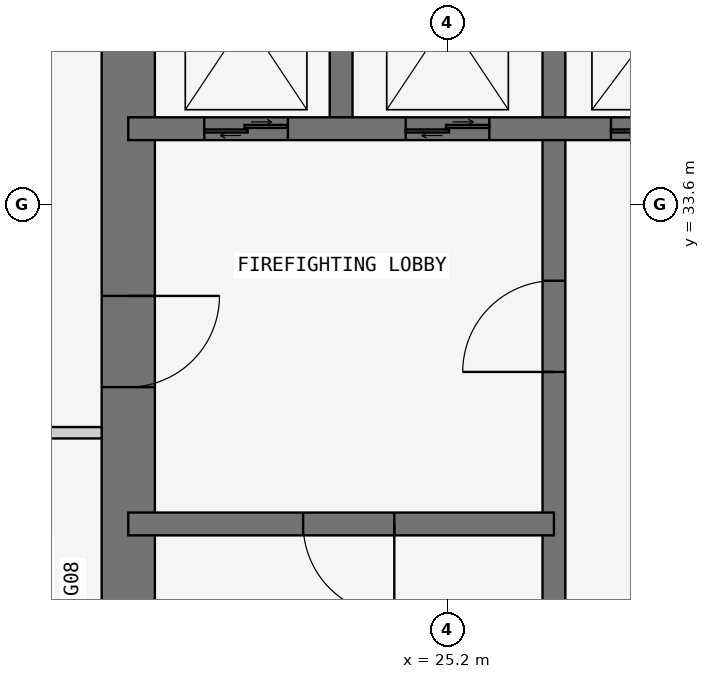
"""IFC4 building model, lengths in metres.
Left out: names, types, materials, properties, quantities, classifications, styles, units other than length and angle.
Written with IfcOpenShell. Run it as: python <this file> out.ifc"""

import sys

from ifc_helpers import new_model, si_unit, direction, frame, frame_2d, origin, place, context, subcontext, project, spatial, rectangle, extrude, element, fill, save


model = new_model("IFC4")
c1 = context("Model", 3, precision=1e-05, world=origin(), true_north=direction((0.0, 1.0)))
c2 = subcontext(c1, "Body", "Model", "MODEL_VIEW")
j1 = project(units=[si_unit("LENGTHUNIT", "METRE"), si_unit("PLANEANGLEUNIT", "RADIAN")], contexts=[c1])
p1 = place(None, origin())
s1 = spatial("IfcSite", under=j1, at=p1, CompositionType="ELEMENT")
p2 = place(p1, origin())
s2 = spatial("IfcBuilding", under=s1, at=p2, CompositionType="ELEMENT")
p3 = place(p2, frame((0.0, 0.0, 226.5)))
s3 = spatial("IfcBuildingStorey", under=s2, at=p3, CompositionType="ELEMENT", Elevation=226.5)
p4 = place(p3, frame((21.0, 37.8, 0.0), z_axis=(0.0, 0.0, 1.0), x_axis=(0.0, -1.0, 0.0)))
e1 = element("IfcWall", 1, at=p4, inside=s3, PredefinedType="SHEAR", context=c2, shape_type="SweptSolid", body=[
    extrude(rectangle(XDim=17.15, YDim=0.7, at=frame_2d((8.575, 0.0))), origin(), (0.0, 0.0, 1.0), 3.6),
])
p5 = place(p4, frame((5.4, 0.0, 0.0)))
e2 = element("IfcOpeningElement", 2, at=p5, cuts=e1, PredefinedType="OPENING", context=c2, shape_type="SweptSolid", body=[
    extrude(rectangle(XDim=1.2, YDim=2.1, at=frame_2d((0.6, 1.05))), frame((0.0, 0.36, 0.0), z_axis=(0.0, -1.0, 0.0), x_axis=(1.0, 0.0, 0.0)), (0.0, 0.0, 1.0), 0.72),
])
p6 = place(p3, frame((26.6, 21.0, 0.0), z_axis=(0.0, 0.0, 1.0), x_axis=(0.0, 1.0, 0.0)))
e3 = element("IfcWall", 3, at=p6, inside=s3, PredefinedType="SHEAR", context=c2, shape_type="SweptSolid", body=[
    extrude(rectangle(XDim=16.8, YDim=0.3, at=frame_2d((8.4, 0.0))), origin(), (0.0, 0.0, 1.0), 3.6),
])
p7 = place(p6, frame((10.4, 0.0, 0.0)))
e4 = element("IfcOpeningElement", 4, at=p7, cuts=e3, PredefinedType="OPENING", context=c2, shape_type="SweptSolid", body=[
    extrude(rectangle(XDim=1.2, YDim=2.1, at=frame_2d((0.6, 1.05))), frame((0.0, 0.16, 0.0), z_axis=(0.0, -1.0, 0.0), x_axis=(1.0, 0.0, 0.0)), (0.0, 0.0, 1.0), 0.32),
])
p8 = place(p3, frame((21.0, 29.4, 0.0), z_axis=(0.0, 0.0, 1.0), x_axis=(1.0, 0.0, 0.0)))
e5 = element("IfcWall", 5, at=p8, inside=s3, PredefinedType="SHEAR", context=c2, shape_type="SweptSolid", body=[
    extrude(rectangle(XDim=5.6, YDim=0.3, at=frame_2d((2.8, 0.0))), origin(), (0.0, 0.0, 1.0), 3.6),
])
p9 = place(p8, frame((2.3, 0.0, 0.0)))
e6 = element("IfcOpeningElement", 6, at=p9, cuts=e5, PredefinedType="OPENING", context=c2, shape_type="SweptSolid", body=[
    extrude(rectangle(XDim=1.2, YDim=2.1, at=frame_2d((0.6, 1.05))), frame((0.0, 0.16, 0.0), z_axis=(0.0, -1.0, 0.0), x_axis=(1.0, 0.0, 0.0)), (0.0, 0.0, 1.0), 0.32),
])
p10 = place(p3, frame((21.0, 34.6, 0.0), z_axis=(0.0, 0.0, 1.0), x_axis=(1.0, 0.0, 0.0)))
e7 = element("IfcWall", 7, at=p10, inside=s3, PredefinedType="SHEAR", context=c2, shape_type="SweptSolid", body=[
    extrude(rectangle(XDim=11.2, YDim=0.3, at=frame_2d((5.6, 0.0))), origin(), (0.0, 0.0, 1.0), 3.6),
])
p11 = place(p10, frame((9.25, 0.0, 0.0)))
e8 = element("IfcOpeningElement", 8, at=p11, cuts=e7, PredefinedType="OPENING", context=c2, shape_type="SweptSolid", body=[
    extrude(rectangle(XDim=1.1, YDim=2.1, at=frame_2d((0.55, 1.05))), frame((0.0, 0.16, 0.0), z_axis=(0.0, -1.0, 0.0), x_axis=(1.0, 0.0, 0.0)), (0.0, 0.0, 1.0), 0.32),
])
p12 = place(p10, frame((1.0, 0.0, 0.0)))
e9 = element("IfcOpeningElement", 9, at=p12, cuts=e7, PredefinedType="OPENING", context=c2, shape_type="SweptSolid", body=[
    extrude(rectangle(XDim=1.1, YDim=2.1, at=frame_2d((0.55, 1.05))), frame((0.0, 0.16, 0.0), z_axis=(0.0, -1.0, 0.0), x_axis=(1.0, 0.0, 0.0)), (0.0, 0.0, 1.0), 0.32),
])
p13 = place(p10, frame((3.65, 0.0, 0.0)))
e10 = element("IfcOpeningElement", 10, at=p13, cuts=e7, PredefinedType="OPENING", context=c2, shape_type="SweptSolid", body=[
    extrude(rectangle(XDim=1.1, YDim=2.1, at=frame_2d((0.55, 1.05))), frame((0.0, 0.16, 0.0), z_axis=(0.0, -1.0, 0.0), x_axis=(1.0, 0.0, 0.0)), (0.0, 0.0, 1.0), 0.32),
])
p14 = place(p10, frame((6.35, 0.0, 0.0)))
e11 = element("IfcOpeningElement", 11, at=p14, cuts=e7, PredefinedType="OPENING", context=c2, shape_type="SweptSolid", body=[
    extrude(rectangle(XDim=1.3, YDim=2.1, at=frame_2d((0.65, 1.05))), frame((0.0, 0.16, 0.0), z_axis=(0.0, -1.0, 0.0), x_axis=(1.0, 0.0, 0.0)), (0.0, 0.0, 1.0), 0.32),
])
p15 = place(p3, frame((23.8, 34.6, 0.0), z_axis=(0.0, 0.0, 1.0), x_axis=(0.0, 1.0, 0.0)))
e12 = element("IfcWall", 12, at=p15, inside=s3, PredefinedType="SHEAR", context=c2, shape_type="SweptSolid", body=[
    extrude(rectangle(XDim=3.2, YDim=0.3, at=frame_2d((1.6, 0.0))), origin(), (0.0, 0.0, 1.0), 3.6),
])
p16 = place(p3, frame((20.65, 30.6, 0.0), z_axis=(0.0, 0.0, 1.0), x_axis=(-1.0, 0.0, 0.0)))
e13 = element("IfcWall", 13, at=p16, inside=s3, PredefinedType="PARTITIONING", context=c2, shape_type="SweptSolid", body=[
    extrude(rectangle(XDim=2.1, YDim=0.15, at=frame_2d((1.05, 0.0))), origin(), (0.0, 0.0, 1.0), 3.45),
])
p17 = place(p5, origin())
e14 = element("IfcDoor", 14, at=p17, inside=s3, OperationType="SINGLE_SWING_LEFT", PredefinedType="DOOR", context=c2, shape_type="SweptSolid", body=[
    extrude(rectangle(XDim=1.2, YDim=2.1, at=frame_2d((0.6, 1.05))), frame((0.0, 0.025, 0.0), z_axis=(0.0, -1.0, 0.0), x_axis=(1.0, 0.0, 0.0)), (0.0, 0.0, 1.0), 0.05),
])
fill(e2, e14)
p18 = place(p9, frame((1.2, 0.0, 0.0), z_axis=(0.0, 0.0, 1.0), x_axis=(-1.0, 0.0, 0.0)))
e15 = element("IfcDoor", 15, at=p18, inside=s3, OperationType="SINGLE_SWING_LEFT", PredefinedType="DOOR", context=c2, shape_type="SweptSolid", body=[
    extrude(rectangle(XDim=1.2, YDim=2.1, at=frame_2d((0.6, 1.05))), frame((0.0, 0.025, 0.0), z_axis=(0.0, -1.0, 0.0), x_axis=(1.0, 0.0, 0.0)), (0.0, 0.0, 1.0), 0.05),
])
fill(e6, e15)
p19 = place(p7, origin())
e16 = element("IfcDoor", 16, at=p19, inside=s3, OperationType="SINGLE_SWING_LEFT", PredefinedType="DOOR", context=c2, shape_type="SweptSolid", body=[
    extrude(rectangle(XDim=1.2, YDim=2.1, at=frame_2d((0.6, 1.05))), frame((0.0, 0.025, 0.0), z_axis=(0.0, -1.0, 0.0), x_axis=(1.0, 0.0, 0.0)), (0.0, 0.0, 1.0), 0.05),
])
fill(e4, e16)
p20 = place(p12, origin())
e17 = element("IfcDoor", 17, at=p20, inside=s3, OperationType="DOUBLE_DOOR_SLIDING", PredefinedType="DOOR", context=c2, shape_type="SweptSolid", body=[
    extrude(rectangle(XDim=1.1, YDim=2.1, at=frame_2d((0.55, 1.05))), frame((0.0, 0.025, 0.0), z_axis=(0.0, -1.0, 0.0), x_axis=(1.0, 0.0, 0.0)), (0.0, 0.0, 1.0), 0.05),
])
fill(e9, e17)
p21 = place(p13, origin())
e18 = element("IfcDoor", 18, at=p21, inside=s3, OperationType="DOUBLE_DOOR_SLIDING", PredefinedType="DOOR", context=c2, shape_type="SweptSolid", body=[
    extrude(rectangle(XDim=1.1, YDim=2.1, at=frame_2d((0.55, 1.05))), frame((0.0, 0.025, 0.0), z_axis=(0.0, -1.0, 0.0), x_axis=(1.0, 0.0, 0.0)), (0.0, 0.0, 1.0), 0.05),
])
fill(e10, e18)
p22 = place(p14, origin())
e19 = element("IfcDoor", 19, at=p22, inside=s3, OperationType="DOUBLE_DOOR_SLIDING", PredefinedType="DOOR", context=c2, shape_type="SweptSolid", body=[
    extrude(rectangle(XDim=1.3, YDim=2.1, at=frame_2d((0.65, 1.05))), frame((0.0, 0.025, 0.0), z_axis=(0.0, -1.0, 0.0), x_axis=(1.0, 0.0, 0.0)), (0.0, 0.0, 1.0), 0.05),
])
fill(e11, e19)
save(model, sys.argv[1])
